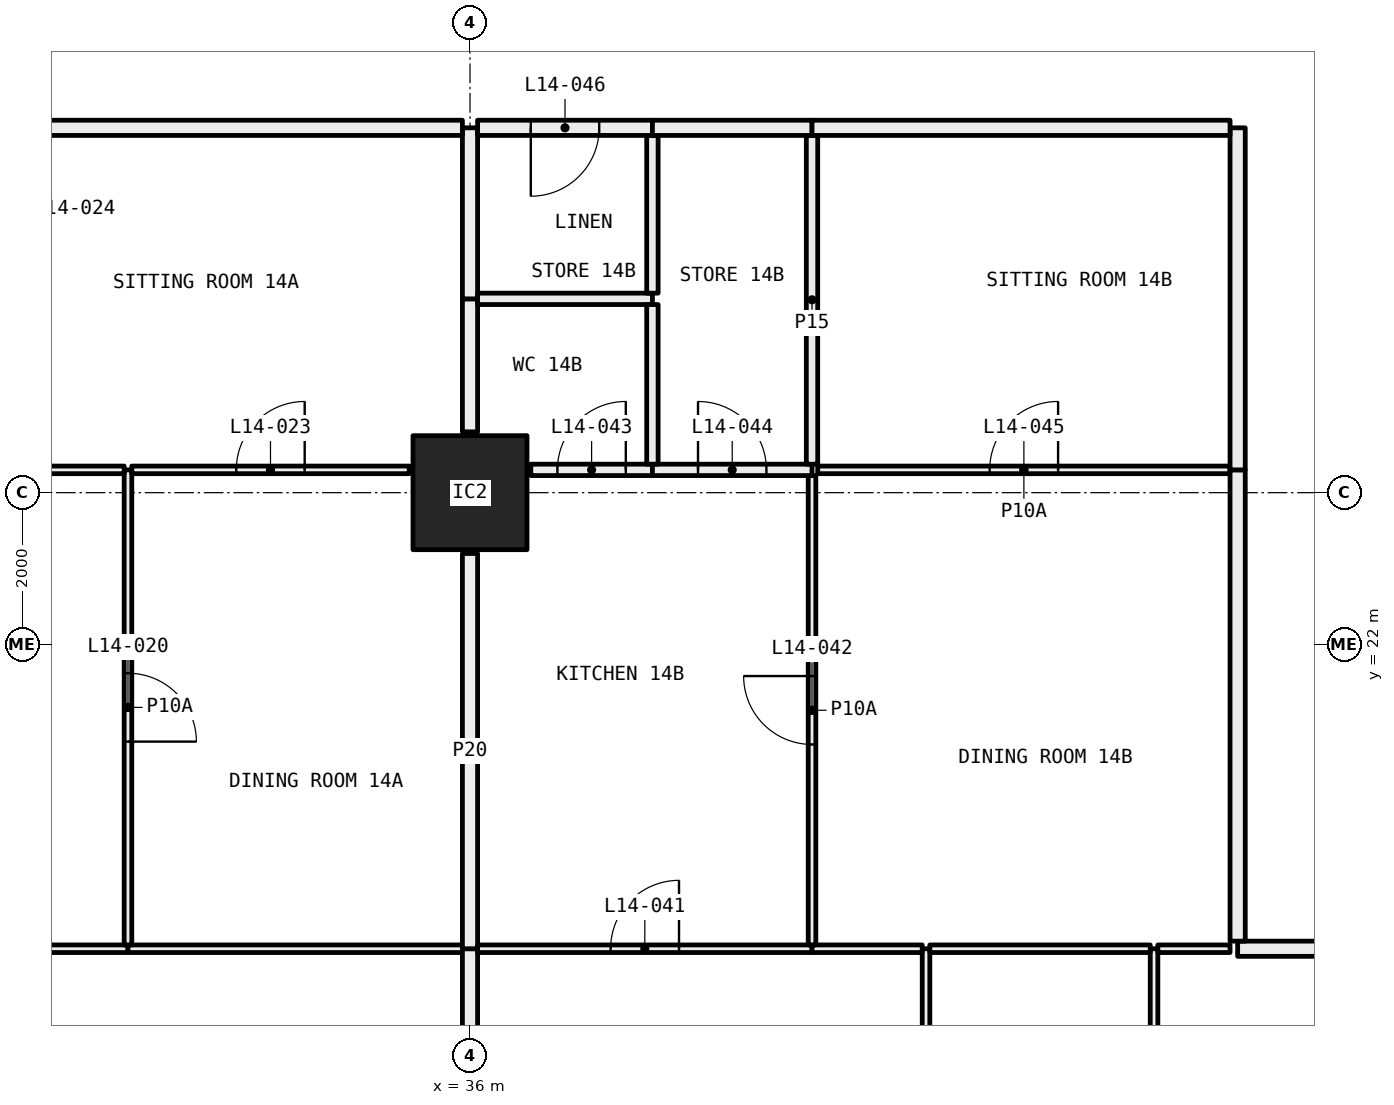
"""IFC4 building model, lengths in metres.
Left out: names, types, materials, properties, quantities, classifications, styles, units other than length and angle.
Written with IfcOpenShell. Run it as: python <this file> out.ifc"""

import sys

from ifc_helpers import new_model, si_unit, direction, frame, frame_2d, origin, origin_2d, place, context, subcontext, project, spatial, rectangle, hollow_rectangle, extrude, element, fill, save


model = new_model("IFC4")
c1 = context("Model", 3, precision=1e-05, world=origin(), true_north=direction((0.0, 1.0)))
c2 = subcontext(c1, "Body", "Model", "MODEL_VIEW")
j1 = project(units=[si_unit("LENGTHUNIT", "METRE"), si_unit("PLANEANGLEUNIT", "RADIAN")], contexts=[c1])
p1 = place(None, origin())
s1 = spatial("IfcSite", under=j1, at=p1, CompositionType="ELEMENT")
p2 = place(p1, origin())
s2 = spatial("IfcBuilding", under=s1, at=p2, CompositionType="ELEMENT")
p3 = place(p2, frame((0.0, 0.0, 61.05)))
s3 = spatial("IfcBuildingStorey", under=s2, at=p3, CompositionType="ELEMENT", Elevation=61.05)
p4 = place(p3, frame((36.0, 24.0, 0.0), z_axis=(0.0, 0.0, 1.0), x_axis=(1.0, 0.0, 0.0)))
e1 = element("IfcColumn", 1, at=p4, inside=s3, PredefinedType="COLUMN", context=c2, shape_type="SweptSolid", body=[
    extrude(hollow_rectangle(XDim=1.5, YDim=1.5, WallThickness=0.065, at=origin_2d()), origin(), (0.0, 0.0, 1.0), 3.05),
])
p5 = place(p3, frame((31.5, 18.0, 0.0), z_axis=(0.0, 0.0, 1.0), x_axis=(-1.0, 0.0, 0.0)))
e2 = element("IfcWall", 2, at=p5, inside=s3, PredefinedType="PARTITIONING", context=c2, shape_type="SweptSolid", body=[
    extrude(rectangle(XDim=4.45, YDim=0.1, at=frame_2d((2.225, 0.0))), origin(), (0.0, 0.0, 1.0), 3.05),
])
p6 = place(p5, frame((1.775, 0.0, 0.0)))
e3 = element("IfcOpeningElement", 3, at=p6, cuts=e2, PredefinedType="OPENING", context=c2, shape_type="SweptSolid", body=[
    extrude(rectangle(XDim=0.9, YDim=2.1, at=frame_2d((0.45, 1.05))), frame((0.0, 0.06, 0.0), z_axis=(0.0, -1.0, 0.0), x_axis=(1.0, 0.0, 0.0)), (0.0, 0.0, 1.0), 0.12),
])
p7 = place(p3, frame((35.9, 18.0, 0.0), z_axis=(0.0, 0.0, 1.0), x_axis=(-1.0, 0.0, 0.0)))
e4 = element("IfcWall", 4, at=p7, inside=s3, PredefinedType="PARTITIONING", context=c2, shape_type="SweptSolid", body=[
    extrude(rectangle(XDim=4.4, YDim=0.1, at=frame_2d((2.2, 0.0))), origin(), (0.0, 0.0, 1.0), 3.05),
])
p8 = place(p3, frame((36.0, 12.8, 0.0), z_axis=(0.0, 0.0, 1.0), x_axis=(0.0, 1.0, 0.0)))
e5 = element("IfcWall", 5, at=p8, inside=s3, PredefinedType="PARTITIONING", context=c2, shape_type="SweptSolid", body=[
    extrude(rectangle(XDim=5.2, YDim=0.2, at=frame_2d((2.6, 0.0))), origin(), (0.0, 0.0, 1.0), 2.45),
])
p9 = place(p3, frame((31.5, 18.05, 0.0), z_axis=(0.0, 0.0, 1.0), x_axis=(0.0, 1.0, 0.0)))
e6 = element("IfcWall", 6, at=p9, inside=s3, PredefinedType="PARTITIONING", context=c2, shape_type="SweptSolid", body=[
    extrude(rectangle(XDim=6.25, YDim=0.1, at=frame_2d((3.125, 0.0))), origin(), (0.0, 0.0, 1.0), 2.45),
])
p10 = place(p9, frame((2.675, 0.0, 0.0)))
e7 = element("IfcOpeningElement", 7, at=p10, cuts=e6, PredefinedType="OPENING", context=c2, shape_type="SweptSolid", body=[
    extrude(rectangle(XDim=0.9, YDim=2.1, at=frame_2d((0.45, 1.05))), frame((0.0, 0.06, 0.0), z_axis=(0.0, -1.0, 0.0), x_axis=(1.0, 0.0, 0.0)), (0.0, 0.0, 1.0), 0.12),
])
p11 = place(p3, frame((31.45, 24.3, 0.0), z_axis=(0.0, 0.0, 1.0), x_axis=(-1.0, 0.0, 0.0)))
e8 = element("IfcWall", 8, at=p11, inside=s3, PredefinedType="PARTITIONING", context=c2, shape_type="SweptSolid", body=[
    extrude(rectangle(XDim=1.375, YDim=0.1, at=frame_2d((0.688, 0.0))), origin(), (0.0, 0.0, 1.0), 3.05),
])
p12 = place(p3, frame((35.2, 24.3, 0.0), z_axis=(0.0, 0.0, 1.0), x_axis=(-1.0, 0.0, 0.0)))
e9 = element("IfcWall", 9, at=p12, inside=s3, PredefinedType="PARTITIONING", context=c2, shape_type="SweptSolid", body=[
    extrude(rectangle(XDim=3.65, YDim=0.1, at=frame_2d((1.825, 0.0))), origin(), (0.0, 0.0, 1.0), 3.05),
])
p13 = place(p12, frame((1.375, 0.0, 0.0)))
e10 = element("IfcOpeningElement", 10, at=p13, cuts=e9, PredefinedType="OPENING", context=c2, shape_type="SweptSolid", body=[
    extrude(rectangle(XDim=0.9, YDim=2.1, at=frame_2d((0.45, 1.05))), frame((0.0, 0.06, 0.0), z_axis=(0.0, -1.0, 0.0), x_axis=(1.0, 0.0, 0.0)), (0.0, 0.0, 1.0), 0.12),
])
p14 = place(p3, frame((36.0, 18.0, 0.0), z_axis=(0.0, 0.0, 1.0), x_axis=(0.0, 1.0, 0.0)))
e11 = element("IfcWall", 11, at=p14, inside=s3, PredefinedType="PARTITIONING", context=c2, shape_type="SweptSolid", body=[
    extrude(rectangle(XDim=5.2, YDim=0.2, at=frame_2d((2.6, 0.0))), origin(), (0.0, 0.0, 1.0), 2.45),
])
p15 = place(p3, frame((36.0, 24.8, 0.0), z_axis=(0.0, 0.0, 1.0), x_axis=(0.0, 1.0, 0.0)))
e12 = element("IfcWall", 12, at=p15, inside=s3, PredefinedType="PARTITIONING", context=c2, shape_type="SweptSolid", body=[
    extrude(rectangle(XDim=1.75, YDim=0.2, at=frame_2d((0.875, 0.0))), origin(), (0.0, 0.0, 1.0), 2.45),
])
p16 = place(p3, frame((36.0, 26.55, 0.0), z_axis=(0.0, 0.0, 1.0), x_axis=(0.0, 1.0, 0.0)))
e13 = element("IfcWall", 13, at=p16, inside=s3, PredefinedType="PARTITIONING", context=c2, shape_type="SweptSolid", body=[
    extrude(rectangle(XDim=2.25, YDim=0.2, at=frame_2d((1.125, 0.0))), origin(), (0.0, 0.0, 1.0), 2.45),
])
p17 = place(p3, frame((35.9, 28.8, 0.0), z_axis=(0.0, 0.0, 1.0), x_axis=(-1.0, 0.0, 0.0)))
e14 = element("IfcWall", 14, at=p17, inside=s3, PredefinedType="PARTITIONING", context=c2, shape_type="SweptSolid", body=[
    extrude(rectangle(XDim=5.9, YDim=0.2, at=frame_2d((2.95, 0.0))), origin(), (0.0, 0.0, 1.0), 3.05),
])
p18 = place(p3, frame((42.0, 12.05, 0.0), z_axis=(0.0, 0.0, 1.0), x_axis=(0.0, 1.0, 0.0)))
e15 = element("IfcWall", 15, at=p18, inside=s3, PredefinedType="PARTITIONING", context=c2, shape_type="SweptSolid", body=[
    extrude(rectangle(XDim=5.95, YDim=0.1, at=frame_2d((2.975, 0.0))), origin(), (0.0, 0.0, 1.0), 2.45),
])
p19 = place(p3, frame((40.5, 18.0, 0.0), z_axis=(0.0, 0.0, 1.0), x_axis=(-1.0, 0.0, 0.0)))
e16 = element("IfcWall", 16, at=p19, inside=s3, PredefinedType="PARTITIONING", context=c2, shape_type="SweptSolid", body=[
    extrude(rectangle(XDim=4.4, YDim=0.1, at=frame_2d((2.2, 0.0))), origin(), (0.0, 0.0, 1.0), 3.05),
])
p20 = place(p19, frame((1.75, 0.0, 0.0)))
e17 = element("IfcOpeningElement", 17, at=p20, cuts=e16, PredefinedType="OPENING", context=c2, shape_type="SweptSolid", body=[
    extrude(rectangle(XDim=0.9, YDim=2.1, at=frame_2d((0.45, 1.05))), frame((0.0, 0.06, 0.0), z_axis=(0.0, -1.0, 0.0), x_axis=(1.0, 0.0, 0.0)), (0.0, 0.0, 1.0), 0.12),
])
p21 = place(p3, frame((41.95, 18.0, 0.0), z_axis=(0.0, 0.0, 1.0), x_axis=(-1.0, 0.0, 0.0)))
e18 = element("IfcWall", 18, at=p21, inside=s3, PredefinedType="PARTITIONING", context=c2, shape_type="SweptSolid", body=[
    extrude(rectangle(XDim=1.45, YDim=0.1, at=frame_2d((0.725, 0.0))), origin(), (0.0, 0.0, 1.0), 3.05),
])
p22 = place(p3, frame((45.0, 12.05, 0.0), z_axis=(0.0, 0.0, 1.0), x_axis=(0.0, 1.0, 0.0)))
e19 = element("IfcWall", 19, at=p22, inside=s3, PredefinedType="PARTITIONING", context=c2, shape_type="SweptSolid", body=[
    extrude(rectangle(XDim=5.95, YDim=0.1, at=frame_2d((2.975, 0.0))), origin(), (0.0, 0.0, 1.0), 2.45),
])
p23 = place(p3, frame((44.95, 18.0, 0.0), z_axis=(0.0, 0.0, 1.0), x_axis=(-1.0, 0.0, 0.0)))
e20 = element("IfcWall", 20, at=p23, inside=s3, PredefinedType="PARTITIONING", context=c2, shape_type="SweptSolid", body=[
    extrude(rectangle(XDim=2.9, YDim=0.1, at=frame_2d((1.45, 0.0))), origin(), (0.0, 0.0, 1.0), 3.05),
])
p24 = place(p3, frame((46.0, 18.0, 0.0), z_axis=(0.0, 0.0, 1.0), x_axis=(-1.0, 0.0, 0.0)))
e21 = element("IfcWall", 21, at=p24, inside=s3, PredefinedType="PARTITIONING", context=c2, shape_type="SweptSolid", body=[
    extrude(rectangle(XDim=0.95, YDim=0.1, at=frame_2d((0.475, 0.0))), origin(), (0.0, 0.0, 1.0), 3.05),
])
p25 = place(p3, frame((49.5, 18.0, 0.0), z_axis=(0.0, 0.0, 1.0), x_axis=(-1.0, 0.0, 0.0)))
e22 = element("IfcWall", 22, at=p25, inside=s3, PredefinedType="PARTITIONING", context=c2, shape_type="SweptSolid", body=[
    extrude(rectangle(XDim=3.4, YDim=0.2, at=frame_2d((1.7, 0.0))), origin(), (0.0, 0.0, 1.0), 3.05),
])
p26 = place(p3, frame((40.5, 18.05, 0.0), z_axis=(0.0, 0.0, 1.0), x_axis=(0.0, 1.0, 0.0)))
e23 = element("IfcWall", 23, at=p26, inside=s3, PredefinedType="PARTITIONING", context=c2, shape_type="SweptSolid", body=[
    extrude(rectangle(XDim=6.175, YDim=0.1, at=frame_2d((3.087, 0.0))), origin(), (0.0, 0.0, 1.0), 2.45),
])
p27 = place(p26, frame((2.637, 0.0, 0.0)))
e24 = element("IfcOpeningElement", 24, at=p27, cuts=e23, PredefinedType="OPENING", context=c2, shape_type="SweptSolid", body=[
    extrude(rectangle(XDim=0.9, YDim=2.1, at=frame_2d((0.45, 1.05))), frame((0.0, 0.06, 0.0), z_axis=(0.0, -1.0, 0.0), x_axis=(1.0, 0.0, 0.0)), (0.0, 0.0, 1.0), 0.12),
])
p28 = place(p3, frame((38.4, 24.3, 0.0), z_axis=(0.0, 0.0, 1.0), x_axis=(-1.0, 0.0, 0.0)))
e25 = element("IfcWall", 25, at=p28, inside=s3, PredefinedType="PARTITIONING", context=c2, shape_type="SweptSolid", body=[
    extrude(rectangle(XDim=1.6, YDim=0.15, at=frame_2d((0.8, 0.0))), origin(), (0.0, 0.0, 1.0), 3.05),
])
p29 = place(p28, frame((0.35, 0.0, 0.0)))
e26 = element("IfcOpeningElement", 26, at=p29, cuts=e25, PredefinedType="OPENING", context=c2, shape_type="SweptSolid", body=[
    extrude(rectangle(XDim=0.9, YDim=2.1, at=frame_2d((0.45, 1.05))), frame((0.0, 0.085, 0.0), z_axis=(0.0, -1.0, 0.0), x_axis=(1.0, 0.0, 0.0)), (0.0, 0.0, 1.0), 0.17),
])
p30 = place(p3, frame((40.5, 24.3, 0.0), z_axis=(0.0, 0.0, 1.0), x_axis=(-1.0, 0.0, 0.0)))
e27 = element("IfcWall", 27, at=p30, inside=s3, PredefinedType="PARTITIONING", context=c2, shape_type="SweptSolid", body=[
    extrude(rectangle(XDim=2.1, YDim=0.15, at=frame_2d((1.05, 0.0))), origin(), (0.0, 0.0, 1.0), 3.05),
])
p31 = place(p30, frame((0.6, 0.0, 0.0)))
e28 = element("IfcOpeningElement", 28, at=p31, cuts=e27, PredefinedType="OPENING", context=c2, shape_type="SweptSolid", body=[
    extrude(rectangle(XDim=0.9, YDim=2.1, at=frame_2d((0.45, 1.05))), frame((0.0, 0.085, 0.0), z_axis=(0.0, -1.0, 0.0), x_axis=(1.0, 0.0, 0.0)), (0.0, 0.0, 1.0), 0.17),
])
p32 = place(p3, frame((46.0, 24.3, 0.0), z_axis=(0.0, 0.0, 1.0), x_axis=(-1.0, 0.0, 0.0)))
e29 = element("IfcWall", 29, at=p32, inside=s3, PredefinedType="PARTITIONING", context=c2, shape_type="SweptSolid", body=[
    extrude(rectangle(XDim=5.425, YDim=0.1, at=frame_2d((2.712, 0.0))), origin(), (0.0, 0.0, 1.0), 3.05),
])
p33 = place(p32, frame((2.262, 0.0, 0.0)))
e30 = element("IfcOpeningElement", 30, at=p33, cuts=e29, PredefinedType="OPENING", context=c2, shape_type="SweptSolid", body=[
    extrude(rectangle(XDim=0.9, YDim=2.1, at=frame_2d((0.45, 1.05))), frame((0.0, 0.06, 0.0), z_axis=(0.0, -1.0, 0.0), x_axis=(1.0, 0.0, 0.0)), (0.0, 0.0, 1.0), 0.12),
])
p34 = place(p3, frame((46.1, 18.1, 0.0), z_axis=(0.0, 0.0, 1.0), x_axis=(0.0, 1.0, 0.0)))
e31 = element("IfcWall", 31, at=p34, inside=s3, PredefinedType="PARTITIONING", context=c2, shape_type="SweptSolid", body=[
    extrude(rectangle(XDim=6.2, YDim=0.2, at=frame_2d((3.1, 0.0))), origin(), (0.0, 0.0, 1.0), 2.45),
])
p35 = place(p3, frame((38.4, 26.55, 0.0), z_axis=(0.0, 0.0, 1.0), x_axis=(-1.0, 0.0, 0.0)))
e32 = element("IfcWall", 32, at=p35, inside=s3, PredefinedType="PARTITIONING", context=c2, shape_type="SweptSolid", body=[
    extrude(rectangle(XDim=2.3, YDim=0.15, at=frame_2d((1.15, 0.0))), origin(), (0.0, 0.0, 1.0), 3.05),
])
p36 = place(p3, frame((38.4, 24.375, 0.0), z_axis=(0.0, 0.0, 1.0), x_axis=(0.0, 1.0, 0.0)))
e33 = element("IfcWall", 33, at=p36, inside=s3, PredefinedType="PARTITIONING", context=c2, shape_type="SweptSolid", body=[
    extrude(rectangle(XDim=2.1, YDim=0.15, at=frame_2d((1.05, 0.0))), origin(), (0.0, 0.0, 1.0), 3.05),
])
p37 = place(p3, frame((38.4, 26.625, 0.0), z_axis=(0.0, 0.0, 1.0), x_axis=(0.0, 1.0, 0.0)))
e34 = element("IfcWall", 34, at=p37, inside=s3, PredefinedType="PARTITIONING", context=c2, shape_type="SweptSolid", body=[
    extrude(rectangle(XDim=2.075, YDim=0.15, at=frame_2d((1.038, 0.0))), origin(), (0.0, 0.0, 1.0), 3.05),
])
p38 = place(p3, frame((38.4, 28.8, 0.0), z_axis=(0.0, 0.0, 1.0), x_axis=(-1.0, 0.0, 0.0)))
e35 = element("IfcWall", 35, at=p38, inside=s3, PredefinedType="PARTITIONING", context=c2, shape_type="SweptSolid", body=[
    extrude(rectangle(XDim=2.3, YDim=0.2, at=frame_2d((1.15, 0.0))), origin(), (0.0, 0.0, 1.0), 3.05),
])
p39 = place(p38, frame((0.7, 0.0, 0.0)))
e36 = element("IfcOpeningElement", 36, at=p39, cuts=e35, PredefinedType="OPENING", context=c2, shape_type="SweptSolid", body=[
    extrude(rectangle(XDim=0.9, YDim=2.1, at=frame_2d((0.45, 1.05))), frame((0.0, 0.11, 0.0), z_axis=(0.0, -1.0, 0.0), x_axis=(1.0, 0.0, 0.0)), (0.0, 0.0, 1.0), 0.22),
])
p40 = place(p3, frame((40.5, 24.375, 0.0), z_axis=(0.0, 0.0, 1.0), x_axis=(0.0, 1.0, 0.0)))
e37 = element("IfcWall", 37, at=p40, inside=s3, PredefinedType="PARTITIONING", context=c2, shape_type="SweptSolid", body=[
    extrude(rectangle(XDim=4.325, YDim=0.15, at=frame_2d((2.163, 0.0))), origin(), (0.0, 0.0, 1.0), 3.05),
])
p41 = place(p3, frame((40.5, 28.8, 0.0), z_axis=(0.0, 0.0, 1.0), x_axis=(-1.0, 0.0, 0.0)))
e38 = element("IfcWall", 38, at=p41, inside=s3, PredefinedType="PARTITIONING", context=c2, shape_type="SweptSolid", body=[
    extrude(rectangle(XDim=2.1, YDim=0.2, at=frame_2d((1.05, 0.0))), origin(), (0.0, 0.0, 1.0), 3.05),
])
p42 = place(p3, frame((46.1, 24.3, 0.0), z_axis=(0.0, 0.0, 1.0), x_axis=(0.0, 1.0, 0.0)))
e39 = element("IfcWall", 39, at=p42, inside=s3, PredefinedType="PARTITIONING", context=c2, shape_type="SweptSolid", body=[
    extrude(rectangle(XDim=4.5, YDim=0.2, at=frame_2d((2.25, 0.0))), origin(), (0.0, 0.0, 1.0), 3.05),
])
p43 = place(p3, frame((46.0, 28.8, 0.0), z_axis=(0.0, 0.0, 1.0), x_axis=(-1.0, 0.0, 0.0)))
e40 = element("IfcWall", 40, at=p43, inside=s3, PredefinedType="PARTITIONING", context=c2, shape_type="SweptSolid", body=[
    extrude(rectangle(XDim=5.5, YDim=0.2, at=frame_2d((2.75, 0.0))), origin(), (0.0, 0.0, 1.0), 3.05),
])
p44 = place(p10, frame((0.9, 0.0, 0.0), x_axis=(-1.0, 0.0, 0.0)))
e41 = element("IfcDoor", 41, at=p44, inside=s3, OperationType="SINGLE_SWING_LEFT", PredefinedType="DOOR", context=c2, shape_type="SweptSolid", body=[
    extrude(rectangle(XDim=0.9, YDim=2.1, at=frame_2d((0.45, 1.05))), frame((0.0, 0.025, 0.0), z_axis=(0.0, -1.0, 0.0), x_axis=(1.0, 0.0, 0.0)), (0.0, 0.0, 1.0), 0.05),
])
fill(e7, e41)
p45 = place(p13, frame((0.9, 0.0, 0.0), x_axis=(-1.0, 0.0, 0.0)))
e42 = element("IfcDoor", 42, at=p45, inside=s3, OperationType="SINGLE_SWING_LEFT", PredefinedType="DOOR", context=c2, shape_type="SweptSolid", body=[
    extrude(rectangle(XDim=0.9, YDim=2.1, at=frame_2d((0.45, 1.05))), frame((0.0, 0.025, 0.0), z_axis=(0.0, -1.0, 0.0), x_axis=(1.0, 0.0, 0.0)), (0.0, 0.0, 1.0), 0.05),
])
fill(e10, e42)
p46 = place(p20, frame((0.9, 0.0, 0.0), x_axis=(-1.0, 0.0, 0.0)))
e43 = element("IfcDoor", 43, at=p46, inside=s3, OperationType="SINGLE_SWING_LEFT", PredefinedType="DOOR", context=c2, shape_type="SweptSolid", body=[
    extrude(rectangle(XDim=0.9, YDim=2.1, at=frame_2d((0.45, 1.05))), frame((0.0, 0.025, 0.0), z_axis=(0.0, -1.0, 0.0), x_axis=(1.0, 0.0, 0.0)), (0.0, 0.0, 1.0), 0.05),
])
fill(e17, e43)
p47 = place(p27, origin())
e44 = element("IfcDoor", 44, at=p47, inside=s3, OperationType="SINGLE_SWING_LEFT", PredefinedType="DOOR", context=c2, shape_type="SweptSolid", body=[
    extrude(rectangle(XDim=0.9, YDim=2.1, at=frame_2d((0.45, 1.05))), frame((0.0, 0.025, 0.0), z_axis=(0.0, -1.0, 0.0), x_axis=(1.0, 0.0, 0.0)), (0.0, 0.0, 1.0), 0.05),
])
fill(e24, e44)
p48 = place(p29, frame((0.9, 0.0, 0.0), x_axis=(-1.0, 0.0, 0.0)))
e45 = element("IfcDoor", 45, at=p48, inside=s3, OperationType="SINGLE_SWING_LEFT", PredefinedType="DOOR", context=c2, shape_type="SweptSolid", body=[
    extrude(rectangle(XDim=0.9, YDim=2.1, at=frame_2d((0.45, 1.05))), frame((0.0, 0.025, 0.0), z_axis=(0.0, -1.0, 0.0), x_axis=(1.0, 0.0, 0.0)), (0.0, 0.0, 1.0), 0.05),
])
fill(e26, e45)
p49 = place(p31, frame((0.9, 0.0, 0.0), x_axis=(-1.0, 0.0, 0.0)))
e46 = element("IfcDoor", 46, at=p49, inside=s3, OperationType="SINGLE_SWING_RIGHT", PredefinedType="DOOR", context=c2, shape_type="SweptSolid", body=[
    extrude(rectangle(XDim=0.9, YDim=2.1, at=frame_2d((0.45, 1.05))), frame((0.0, 0.025, 0.0), z_axis=(0.0, -1.0, 0.0), x_axis=(1.0, 0.0, 0.0)), (0.0, 0.0, 1.0), 0.05),
])
fill(e28, e46)
p50 = place(p33, frame((0.9, 0.0, 0.0), x_axis=(-1.0, 0.0, 0.0)))
e47 = element("IfcDoor", 47, at=p50, inside=s3, OperationType="SINGLE_SWING_LEFT", PredefinedType="DOOR", context=c2, shape_type="SweptSolid", body=[
    extrude(rectangle(XDim=0.9, YDim=2.1, at=frame_2d((0.45, 1.05))), frame((0.0, 0.025, 0.0), z_axis=(0.0, -1.0, 0.0), x_axis=(1.0, 0.0, 0.0)), (0.0, 0.0, 1.0), 0.05),
])
fill(e30, e47)
p51 = place(p39, origin())
e48 = element("IfcDoor", 48, at=p51, inside=s3, OperationType="SINGLE_SWING_LEFT", PredefinedType="DOOR", context=c2, shape_type="SweptSolid", body=[
    extrude(rectangle(XDim=0.9, YDim=2.1, at=frame_2d((0.45, 1.05))), frame((0.0, 0.025, 0.0), z_axis=(0.0, -1.0, 0.0), x_axis=(1.0, 0.0, 0.0)), (0.0, 0.0, 1.0), 0.05),
])
fill(e36, e48)
save(model, sys.argv[1])
